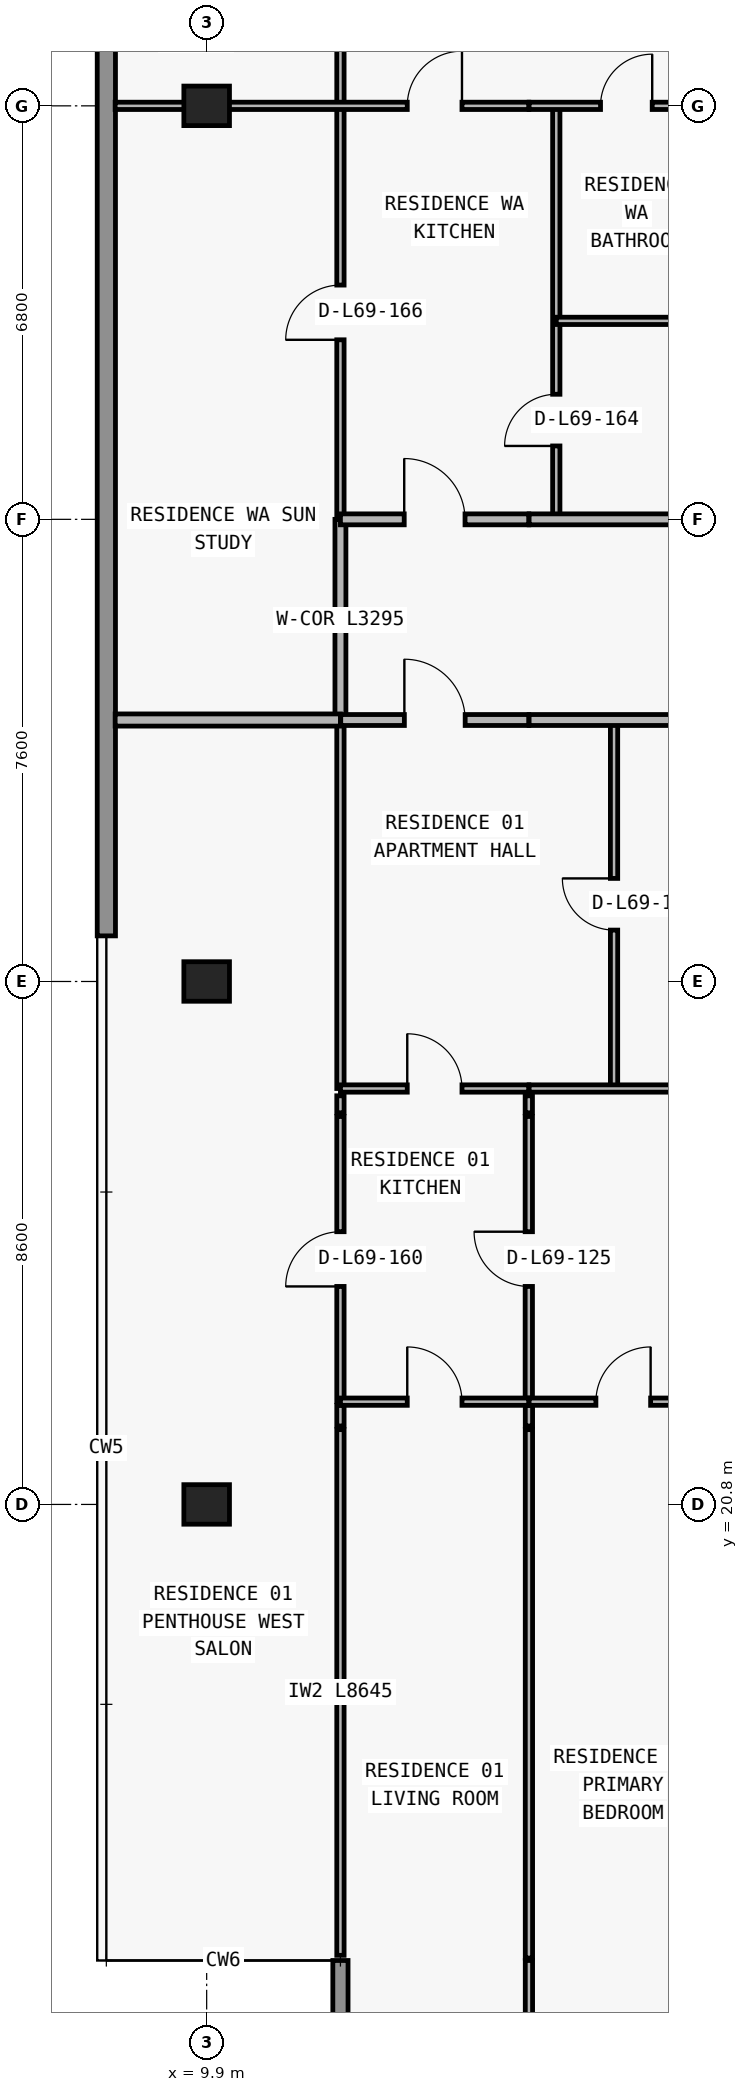
"""IFC4 building model, lengths in metres.
Left out: names, types, materials, properties, quantities, classifications, styles, units other than length and angle.
Written with IfcOpenShell. Run it as: python <this file> out.ifc"""

import sys

from ifc_helpers import new_model, si_unit, direction, frame, frame_2d, origin, origin_2d, place, context, subcontext, project, spatial, rectangle, extrude, element, fill, save


model = new_model("IFC4")
c1 = context("Model", 3, precision=1e-05, world=origin(), true_north=direction((0.0, 1.0)))
c2 = subcontext(c1, "Body", "Model", "MODEL_VIEW")
j1 = project(units=[si_unit("LENGTHUNIT", "METRE"), si_unit("PLANEANGLEUNIT", "RADIAN")], contexts=[c1])
p1 = place(None, origin())
s1 = spatial("IfcSite", under=j1, at=p1, CompositionType="ELEMENT")
p2 = place(p1, origin())
s2 = spatial("IfcBuilding", under=s1, at=p2, CompositionType="ELEMENT")
p3 = place(p2, frame((0.0, 0.0, 246.3)))
s3 = spatial("IfcBuildingStorey", under=s2, at=p3, CompositionType="ELEMENT", Elevation=246.3)
for number, where, z_axis, x_axis in (
    (1, (9.9, 20.8, 0.0), (0.0, 0.0, 1.0), (1.0, 0.0, 0.0)),
    (2, (9.9, 29.4, 0.0), (0.0, 0.0, 1.0), (1.0, 0.0, 0.0)),
    (3, (9.9, 43.8, 0.0), (0.0, 0.0, 1.0), (1.0, 0.0, 0.0)),
):
    element("IfcColumn", number, at=place(p3, frame(where, z_axis=z_axis, x_axis=x_axis)), inside=s3, PredefinedType="COLUMN", context=c2, shape_type="SweptSolid", body=[
        extrude(rectangle(XDim=0.75, YDim=0.65, at=origin_2d()), origin(), (0.0, 0.0, 1.0), 3.05),
    ])
p4 = place(p3, frame((12.1, 13.3, 0.0), z_axis=(0.0, 0.0, 1.0), x_axis=(0.0, -1.0, 0.0)))
e4 = element("IfcWall", 4, at=p4, inside=s3, PredefinedType="ELEMENTEDWALL", context=c2, shape_type="SweptSolid", body=[
    extrude(rectangle(XDim=3.45, YDim=0.25, at=frame_2d((1.725, 0.0))), origin(), (0.0, 0.0, 1.0), 3.05),
])
p5 = place(p3, frame((8.25, 30.15, 0.0), z_axis=(0.0, 0.0, 1.0), x_axis=(0.0, 1.0, 0.0)))
e5 = element("IfcWall", 5, at=p5, inside=s3, PredefinedType="STANDARD", context=c2, shape_type="SweptSolid", body=[
    extrude(rectangle(XDim=16.85, YDim=0.3, at=frame_2d((8.425, 0.0))), origin(), (0.0, 0.0, 1.0), 3.05),
])
p6 = place(p3, frame((12.1, 13.385, 0.0), z_axis=(0.0, 0.0, 1.0), x_axis=(0.0, 1.0, 0.0)))
e6 = element("IfcWall", 6, at=p6, inside=s3, PredefinedType="PARTITIONING", context=c2, shape_type="SweptSolid", body=[
    extrude(rectangle(XDim=8.645, YDim=0.12, at=frame_2d((4.323, 0.0))), origin(), (0.0, 0.0, 1.0), 2.725),
])
p7 = place(p3, frame((12.1, 22.09, 0.0), z_axis=(0.0, 0.0, 1.0), x_axis=(0.0, 1.0, 0.0)))
e7 = element("IfcWall", 7, at=p7, inside=s3, PredefinedType="PARTITIONING", context=c2, shape_type="SweptSolid", body=[
    extrude(rectangle(XDim=0.34, YDim=0.12, at=frame_2d((0.17, 0.0))), origin(), (0.0, 0.0, 1.0), 2.725),
])
p8 = place(p3, frame((12.1, 22.49, 0.0), z_axis=(0.0, 0.0, 1.0), x_axis=(0.0, 1.0, 0.0)))
e8 = element("IfcWall", 8, at=p8, inside=s3, PredefinedType="PARTITIONING", context=c2, shape_type="SweptSolid", body=[
    extrude(rectangle(XDim=4.69, YDim=0.12, at=frame_2d((2.345, 0.0))), origin(), (0.0, 0.0, 1.0), 2.725),
])
p9 = place(p8, frame((1.895, 0.0, 0.0)))
e9 = element("IfcOpeningElement", 9, at=p9, cuts=e8, PredefinedType="OPENING", context=c2, shape_type="SweptSolid", body=[
    extrude(rectangle(XDim=0.9, YDim=2.15, at=frame_2d((0.45, 1.075))), frame((0.0, 0.07, 0.0), z_axis=(0.0, -1.0, 0.0), x_axis=(1.0, 0.0, 0.0)), (0.0, 0.0, 1.0), 0.14),
])
p10 = place(p3, frame((12.1, 27.24, 0.0), z_axis=(0.0, 0.0, 1.0), x_axis=(0.0, 1.0, 0.0)))
e10 = element("IfcWall", 10, at=p10, inside=s3, PredefinedType="PARTITIONING", context=c2, shape_type="SweptSolid", body=[
    extrude(rectangle(XDim=0.28, YDim=0.12, at=frame_2d((0.14, 0.0))), origin(), (0.0, 0.0, 1.0), 2.725),
])
p11 = place(p3, frame((12.1, 27.64, 0.0), z_axis=(0.0, 0.0, 1.0), x_axis=(0.0, 1.0, 0.0)))
e11 = element("IfcWall", 11, at=p11, inside=s3, PredefinedType="PARTITIONING", context=c2, shape_type="SweptSolid", body=[
    extrude(rectangle(XDim=6.06, YDim=0.12, at=frame_2d((3.03, 0.0))), origin(), (0.0, 0.0, 1.0), 2.725),
])
p12 = place(p3, frame((12.1, 33.705, 0.0), z_axis=(0.0, 0.0, 1.0), x_axis=(0.0, 1.0, 0.0)))
e12 = element("IfcWall", 12, at=p12, inside=s3, PredefinedType="PARTITIONING", context=c2, shape_type="SweptSolid", body=[
    extrude(rectangle(XDim=3.295, YDim=0.18, at=frame_2d((1.647, 0.0))), origin(), (0.0, 0.0, 1.0), 2.725),
])
p13 = place(p3, frame((12.1, 37.005, 0.0), z_axis=(0.0, 0.0, 1.0), x_axis=(0.0, 1.0, 0.0)))
e13 = element("IfcWall", 13, at=p13, inside=s3, PredefinedType="PARTITIONING", context=c2, shape_type="SweptSolid", body=[
    extrude(rectangle(XDim=9.875, YDim=0.12, at=frame_2d((4.938, 0.0))), origin(), (0.0, 0.0, 1.0), 2.725),
])
p14 = place(p13, frame((2.948, 0.0, 0.0)))
e14 = element("IfcOpeningElement", 14, at=p14, cuts=e13, PredefinedType="OPENING", context=c2, shape_type="SweptSolid", body=[
    extrude(rectangle(XDim=0.9, YDim=2.15, at=frame_2d((0.45, 1.075))), frame((0.0, 0.07, 0.0), z_axis=(0.0, -1.0, 0.0), x_axis=(1.0, 0.0, 0.0)), (0.0, 0.0, 1.0), 0.14),
])
p15 = place(p13, frame((7.885, 0.0, 0.0)))
e15 = element("IfcOpeningElement", 15, at=p15, cuts=e13, PredefinedType="OPENING", context=c2, shape_type="SweptSolid", body=[
    extrude(rectangle(XDim=0.9, YDim=2.15, at=frame_2d((0.45, 1.075))), frame((0.0, 0.07, 0.0), z_axis=(0.0, -1.0, 0.0), x_axis=(1.0, 0.0, 0.0)), (0.0, 0.0, 1.0), 0.14),
])
p16 = place(p3, frame((15.198, 22.49, 0.0), z_axis=(0.0, 0.0, 1.0), x_axis=(0.0, 1.0, 0.0)))
e16 = element("IfcWall", 16, at=p16, inside=s3, PredefinedType="PARTITIONING", context=c2, shape_type="SweptSolid", body=[
    extrude(rectangle(XDim=4.69, YDim=0.12, at=frame_2d((2.345, 0.0))), origin(), (0.0, 0.0, 1.0), 3.05),
])
p17 = place(p16, frame((1.895, 0.0, 0.0)))
e17 = element("IfcOpeningElement", 17, at=p17, cuts=e16, PredefinedType="OPENING", context=c2, shape_type="SweptSolid", body=[
    extrude(rectangle(XDim=0.9, YDim=2.15, at=frame_2d((0.45, 1.075))), frame((0.0, 0.07, 0.0), z_axis=(0.0, -1.0, 0.0), x_axis=(1.0, 0.0, 0.0)), (0.0, 0.0, 1.0), 0.14),
])
p18 = place(p3, frame((15.198, 27.24, 0.0), z_axis=(0.0, 0.0, 1.0), x_axis=(0.0, 1.0, 0.0)))
e18 = element("IfcWall", 18, at=p18, inside=s3, PredefinedType="PARTITIONING", context=c2, shape_type="SweptSolid", body=[
    extrude(rectangle(XDim=0.28, YDim=0.12, at=frame_2d((0.14, 0.0))), origin(), (0.0, 0.0, 1.0), 3.05),
])
p19 = place(p3, frame((15.2, 9.995, 0.0), z_axis=(0.0, 0.0, 1.0), x_axis=(0.0, 1.0, 0.0)))
e19 = element("IfcWall", 19, at=p19, inside=s3, PredefinedType="PARTITIONING", context=c2, shape_type="SweptSolid", body=[
    extrude(rectangle(XDim=3.305, YDim=0.12, at=frame_2d((1.652, 0.0))), origin(), (0.0, 0.0, 1.0), 3.05),
])
p20 = place(p3, frame((15.2, 13.34, 0.0), z_axis=(0.0, 0.0, 1.0), x_axis=(0.0, 1.0, 0.0)))
e20 = element("IfcWall", 20, at=p20, inside=s3, PredefinedType="PARTITIONING", context=c2, shape_type="SweptSolid", body=[
    extrude(rectangle(XDim=8.69, YDim=0.12, at=frame_2d((4.345, 0.0))), origin(), (0.0, 0.0, 1.0), 3.05),
])
p21 = place(p3, frame((15.2, 22.09, 0.0), z_axis=(0.0, 0.0, 1.0), x_axis=(0.0, 1.0, 0.0)))
e21 = element("IfcWall", 21, at=p21, inside=s3, PredefinedType="PARTITIONING", context=c2, shape_type="SweptSolid", body=[
    extrude(rectangle(XDim=0.34, YDim=0.12, at=frame_2d((0.17, 0.0))), origin(), (0.0, 0.0, 1.0), 3.05),
])
p22 = place(p3, frame((15.65, 37.0, 0.0), z_axis=(0.0, 0.0, 1.0), x_axis=(0.0, 1.0, 0.0)))
e22 = element("IfcWall", 22, at=p22, inside=s3, PredefinedType="PARTITIONING", context=c2, shape_type="SweptSolid", body=[
    extrude(rectangle(XDim=6.8, YDim=0.12, at=frame_2d((3.4, 0.0))), origin(), (0.0, 0.0, 1.0), 3.05),
])
p23 = place(p22, frame((1.207, 0.0, 0.0)))
e23 = element("IfcOpeningElement", 23, at=p23, cuts=e22, PredefinedType="OPENING", context=c2, shape_type="SweptSolid", body=[
    extrude(rectangle(XDim=0.85, YDim=2.1, at=frame_2d((0.425, 1.05))), frame((0.0, 0.07, 0.0), z_axis=(0.0, -1.0, 0.0), x_axis=(1.0, 0.0, 0.0)), (0.0, 0.0, 1.0), 0.14),
])
p24 = place(p3, frame((16.6, 27.64, 0.0), z_axis=(0.0, 0.0, 1.0), x_axis=(0.0, 1.0, 0.0)))
e24 = element("IfcWall", 24, at=p24, inside=s3, PredefinedType="PARTITIONING", context=c2, shape_type="SweptSolid", body=[
    extrude(rectangle(XDim=6.06, YDim=0.12, at=frame_2d((3.03, 0.0))), origin(), (0.0, 0.0, 1.0), 3.05),
])
p25 = place(p24, frame((2.605, 0.0, 0.0)))
e25 = element("IfcOpeningElement", 25, at=p25, cuts=e24, PredefinedType="OPENING", context=c2, shape_type="SweptSolid", body=[
    extrude(rectangle(XDim=0.85, YDim=2.1, at=frame_2d((0.425, 1.05))), frame((0.0, 0.07, 0.0), z_axis=(0.0, -1.0, 0.0), x_axis=(1.0, 0.0, 0.0)), (0.0, 0.0, 1.0), 0.14),
])
p26 = place(p3, frame((12.1, 22.49, 0.0), z_axis=(0.0, 0.0, 1.0), x_axis=(1.0, 0.0, 0.0)))
e26 = element("IfcWall", 26, at=p26, inside=s3, PredefinedType="PARTITIONING", context=c2, shape_type="SweptSolid", body=[
    extrude(rectangle(XDim=3.098, YDim=0.12, at=frame_2d((1.549, 0.0))), origin(), (0.0, 0.0, 1.0), 3.05),
])
p27 = place(p26, frame((1.099, 0.0, 0.0)))
e27 = element("IfcOpeningElement", 27, at=p27, cuts=e26, PredefinedType="OPENING", context=c2, shape_type="SweptSolid", body=[
    extrude(rectangle(XDim=0.9, YDim=2.15, at=frame_2d((0.45, 1.075))), frame((0.0, 0.07, 0.0), z_axis=(0.0, -1.0, 0.0), x_axis=(1.0, 0.0, 0.0)), (0.0, 0.0, 1.0), 0.14),
])
p28 = place(p3, frame((15.203, 22.49, 0.0), z_axis=(0.0, 0.0, 1.0), x_axis=(1.0, 0.0, 0.0)))
e28 = element("IfcWall", 28, at=p28, inside=s3, PredefinedType="PARTITIONING", context=c2, shape_type="SweptSolid", body=[
    extrude(rectangle(XDim=3.097, YDim=0.12, at=frame_2d((1.549, 0.0))), origin(), (0.0, 0.0, 1.0), 3.05),
])
p29 = place(p28, frame((1.098, 0.0, 0.0)))
e29 = element("IfcOpeningElement", 29, at=p29, cuts=e28, PredefinedType="OPENING", context=c2, shape_type="SweptSolid", body=[
    extrude(rectangle(XDim=0.9, YDim=2.15, at=frame_2d((0.45, 1.075))), frame((0.0, 0.07, 0.0), z_axis=(0.0, -1.0, 0.0), x_axis=(1.0, 0.0, 0.0)), (0.0, 0.0, 1.0), 0.14),
])
p30 = place(p3, frame((12.1, 27.64, 0.0), z_axis=(0.0, 0.0, 1.0), x_axis=(1.0, 0.0, 0.0)))
e30 = element("IfcWall", 30, at=p30, inside=s3, PredefinedType="PARTITIONING", context=c2, shape_type="SweptSolid", body=[
    extrude(rectangle(XDim=3.098, YDim=0.12, at=frame_2d((1.549, 0.0))), origin(), (0.0, 0.0, 1.0), 3.05),
])
p31 = place(p30, frame((1.099, 0.0, 0.0)))
e31 = element("IfcOpeningElement", 31, at=p31, cuts=e30, PredefinedType="OPENING", context=c2, shape_type="SweptSolid", body=[
    extrude(rectangle(XDim=0.9, YDim=2.15, at=frame_2d((0.45, 1.075))), frame((0.0, 0.07, 0.0), z_axis=(0.0, -1.0, 0.0), x_axis=(1.0, 0.0, 0.0)), (0.0, 0.0, 1.0), 0.14),
])
p32 = place(p3, frame((15.203, 27.64, 0.0), z_axis=(0.0, 0.0, 1.0), x_axis=(1.0, 0.0, 0.0)))
e32 = element("IfcWall", 32, at=p32, inside=s3, PredefinedType="PARTITIONING", context=c2, shape_type="SweptSolid", body=[
    extrude(rectangle(XDim=3.097, YDim=0.12, at=frame_2d((1.549, 0.0))), origin(), (0.0, 0.0, 1.0), 3.05),
])
p33 = place(p3, frame((8.395, 33.7, 0.0), z_axis=(0.0, 0.0, 1.0), x_axis=(1.0, 0.0, 0.0)))
e33 = element("IfcWall", 33, at=p33, inside=s3, PredefinedType="PARTITIONING", context=c2, shape_type="SweptSolid", body=[
    extrude(rectangle(XDim=3.705, YDim=0.2, at=frame_2d((1.853, 0.0))), origin(), (0.0, 0.0, 1.0), 3.05),
])
p34 = place(p3, frame((12.105, 33.7, 0.0), z_axis=(0.0, 0.0, 1.0), x_axis=(1.0, 0.0, 0.0)))
e34 = element("IfcWall", 34, at=p34, inside=s3, PredefinedType="PARTITIONING", context=c2, shape_type="SweptSolid", body=[
    extrude(rectangle(XDim=3.093, YDim=0.18, at=frame_2d((1.546, 0.0))), origin(), (0.0, 0.0, 1.0), 3.05),
])
p35 = place(p34, frame((1.046, 0.0, 0.0)))
e35 = element("IfcOpeningElement", 35, at=p35, cuts=e34, PredefinedType="OPENING", context=c2, shape_type="SweptSolid", body=[
    extrude(rectangle(XDim=1.0, YDim=2.2, at=frame_2d((0.5, 1.1))), frame((0.0, 0.1, 0.0), z_axis=(0.0, -1.0, 0.0), x_axis=(1.0, 0.0, 0.0)), (0.0, 0.0, 1.0), 0.2),
])
p36 = place(p3, frame((15.203, 33.7, 0.0), z_axis=(0.0, 0.0, 1.0), x_axis=(1.0, 0.0, 0.0)))
e36 = element("IfcWall", 36, at=p36, inside=s3, PredefinedType="PARTITIONING", context=c2, shape_type="SweptSolid", body=[
    extrude(rectangle(XDim=25.992, YDim=0.18, at=frame_2d((12.996, 0.0))), origin(), (0.0, 0.0, 1.0), 3.05),
])
p37 = place(p36, frame((5.972, 0.0, 0.0)))
e37 = element("IfcOpeningElement", 37, at=p37, cuts=e36, PredefinedType="OPENING", context=c2, shape_type="SweptSolid", body=[
    extrude(rectangle(XDim=1.0, YDim=2.2, at=frame_2d((0.5, 1.1))), frame((0.0, 0.1, 0.0), z_axis=(0.0, -1.0, 0.0), x_axis=(1.0, 0.0, 0.0)), (0.0, 0.0, 1.0), 0.2),
])
p38 = place(p36, frame((14.364, 0.0, 0.0)))
e38 = element("IfcOpeningElement", 38, at=p38, cuts=e36, PredefinedType="OPENING", context=c2, shape_type="SweptSolid", body=[
    extrude(rectangle(XDim=1.0, YDim=2.2, at=frame_2d((0.5, 1.1))), frame((0.0, 0.1, 0.0), z_axis=(0.0, -1.0, 0.0), x_axis=(1.0, 0.0, 0.0)), (0.0, 0.0, 1.0), 0.2),
])
p39 = place(p3, frame((12.1, 37.0, 0.0), z_axis=(0.0, 0.0, 1.0), x_axis=(1.0, 0.0, 0.0)))
e39 = element("IfcWall", 39, at=p39, inside=s3, PredefinedType="PARTITIONING", context=c2, shape_type="SweptSolid", body=[
    extrude(rectangle(XDim=3.098, YDim=0.18, at=frame_2d((1.549, 0.0))), origin(), (0.0, 0.0, 1.0), 3.05),
])
p40 = place(p39, frame((1.049, 0.0, 0.0)))
e40 = element("IfcOpeningElement", 40, at=p40, cuts=e39, PredefinedType="OPENING", context=c2, shape_type="SweptSolid", body=[
    extrude(rectangle(XDim=1.0, YDim=2.2, at=frame_2d((0.5, 1.1))), frame((0.0, 0.1, 0.0), z_axis=(0.0, -1.0, 0.0), x_axis=(1.0, 0.0, 0.0)), (0.0, 0.0, 1.0), 0.2),
])
p41 = place(p3, frame((15.203, 37.0, 0.0), z_axis=(0.0, 0.0, 1.0), x_axis=(1.0, 0.0, 0.0)))
e41 = element("IfcWall", 41, at=p41, inside=s3, PredefinedType="PARTITIONING", context=c2, shape_type="SweptSolid", body=[
    extrude(rectangle(XDim=2.742, YDim=0.18, at=frame_2d((1.371, 0.0))), origin(), (0.0, 0.0, 1.0), 3.05),
])
p42 = place(p3, frame((15.65, 40.264, 0.0), z_axis=(0.0, 0.0, 1.0), x_axis=(1.0, 0.0, 0.0)))
e42 = element("IfcWall", 42, at=p42, inside=s3, PredefinedType="PARTITIONING", context=c2, shape_type="SweptSolid", body=[
    extrude(rectangle(XDim=2.305, YDim=0.12, at=frame_2d((1.153, 0.0))), origin(), (0.0, 0.0, 1.0), 3.05),
])
p43 = place(p3, frame((8.395, 43.8, 0.0), z_axis=(0.0, 0.0, 1.0), x_axis=(1.0, 0.0, 0.0)))
e43 = element("IfcWall", 43, at=p43, inside=s3, PredefinedType="PARTITIONING", context=c2, shape_type="SweptSolid", body=[
    extrude(rectangle(XDim=6.803, YDim=0.12, at=frame_2d((3.401, 0.0))), origin(), (0.0, 0.0, 1.0), 2.418),
])
p44 = place(p43, frame((4.804, 0.0, 0.0)))
e44 = element("IfcOpeningElement", 44, at=p44, cuts=e43, PredefinedType="OPENING", context=c2, shape_type="SweptSolid", body=[
    extrude(rectangle(XDim=0.9, YDim=2.15, at=frame_2d((0.45, 1.075))), frame((0.0, 0.07, 0.0), z_axis=(0.0, -1.0, 0.0), x_axis=(1.0, 0.0, 0.0)), (0.0, 0.0, 1.0), 0.14),
])
p45 = place(p3, frame((15.203, 43.8, 0.0), z_axis=(0.0, 0.0, 1.0), x_axis=(1.0, 0.0, 0.0)))
e45 = element("IfcWall", 45, at=p45, inside=s3, PredefinedType="PARTITIONING", context=c2, shape_type="SweptSolid", body=[
    extrude(rectangle(XDim=2.752, YDim=0.12, at=frame_2d((1.376, 0.0))), origin(), (0.0, 0.0, 1.0), 2.418),
])
p46 = place(p45, frame((1.175, 0.0, 0.0)))
e46 = element("IfcOpeningElement", 46, at=p46, cuts=e45, PredefinedType="OPENING", context=c2, shape_type="SweptSolid", body=[
    extrude(rectangle(XDim=0.85, YDim=2.1, at=frame_2d((0.425, 1.05))), frame((0.0, 0.07, 0.0), z_axis=(0.0, -1.0, 0.0), x_axis=(1.0, 0.0, 0.0)), (0.0, 0.0, 1.0), 0.14),
])
p47 = place(p35, origin())
e47 = element("IfcDoor", 47, at=p47, inside=s3, OperationType="SINGLE_SWING_LEFT", PredefinedType="DOOR", context=c2, shape_type="SweptSolid", body=[
    extrude(rectangle(XDim=1.0, YDim=2.2, at=frame_2d((0.5, 1.1))), frame((0.0, 0.025, 0.0), z_axis=(0.0, -1.0, 0.0), x_axis=(1.0, 0.0, 0.0)), (0.0, 0.0, 1.0), 0.05),
])
fill(e35, e47)
p48 = place(p25, origin())
e48 = element("IfcDoor", 48, at=p48, inside=s3, OperationType="SINGLE_SWING_RIGHT", PredefinedType="DOOR", context=c2, shape_type="SweptSolid", body=[
    extrude(rectangle(XDim=0.85, YDim=2.1, at=frame_2d((0.425, 1.05))), frame((0.0, 0.025, 0.0), z_axis=(0.0, -1.0, 0.0), x_axis=(1.0, 0.0, 0.0)), (0.0, 0.0, 1.0), 0.05),
])
fill(e25, e48)
p49 = place(p31, origin())
e49 = element("IfcDoor", 49, at=p49, inside=s3, OperationType="SINGLE_SWING_LEFT", PredefinedType="DOOR", context=c2, shape_type="SweptSolid", body=[
    extrude(rectangle(XDim=0.9, YDim=2.15, at=frame_2d((0.45, 1.075))), frame((0.0, 0.025, 0.0), z_axis=(0.0, -1.0, 0.0), x_axis=(1.0, 0.0, 0.0)), (0.0, 0.0, 1.0), 0.05),
])
fill(e31, e49)
p50 = place(p17, origin())
e50 = element("IfcDoor", 50, at=p50, inside=s3, OperationType="SINGLE_SWING_RIGHT", PredefinedType="DOOR", context=c2, shape_type="SweptSolid", body=[
    extrude(rectangle(XDim=0.9, YDim=2.15, at=frame_2d((0.45, 1.075))), frame((0.0, 0.025, 0.0), z_axis=(0.0, -1.0, 0.0), x_axis=(1.0, 0.0, 0.0)), (0.0, 0.0, 1.0), 0.05),
])
fill(e17, e50)
p51 = place(p27, origin())
e51 = element("IfcDoor", 51, at=p51, inside=s3, OperationType="SINGLE_SWING_LEFT", PredefinedType="DOOR", context=c2, shape_type="SweptSolid", body=[
    extrude(rectangle(XDim=0.9, YDim=2.15, at=frame_2d((0.45, 1.075))), frame((0.0, 0.025, 0.0), z_axis=(0.0, -1.0, 0.0), x_axis=(1.0, 0.0, 0.0)), (0.0, 0.0, 1.0), 0.05),
])
fill(e27, e51)
p52 = place(p29, origin())
e52 = element("IfcDoor", 52, at=p52, inside=s3, OperationType="SINGLE_SWING_RIGHT", PredefinedType="DOOR", context=c2, shape_type="SweptSolid", body=[
    extrude(rectangle(XDim=0.9, YDim=2.15, at=frame_2d((0.45, 1.075))), frame((0.0, 0.025, 0.0), z_axis=(0.0, -1.0, 0.0), x_axis=(1.0, 0.0, 0.0)), (0.0, 0.0, 1.0), 0.05),
])
fill(e29, e52)
p53 = place(p9, origin())
e53 = element("IfcDoor", 53, at=p53, inside=s3, OperationType="SINGLE_SWING_LEFT", PredefinedType="DOOR", context=c2, shape_type="SweptSolid", body=[
    extrude(rectangle(XDim=0.9, YDim=2.15, at=frame_2d((0.45, 1.075))), frame((0.0, 0.025, 0.0), z_axis=(0.0, -1.0, 0.0), x_axis=(1.0, 0.0, 0.0)), (0.0, 0.0, 1.0), 0.05),
])
fill(e9, e53)
p54 = place(p40, origin())
e54 = element("IfcDoor", 54, at=p54, inside=s3, OperationType="SINGLE_SWING_LEFT", PredefinedType="DOOR", context=c2, shape_type="SweptSolid", body=[
    extrude(rectangle(XDim=1.0, YDim=2.2, at=frame_2d((0.5, 1.1))), frame((0.0, 0.025, 0.0), z_axis=(0.0, -1.0, 0.0), x_axis=(1.0, 0.0, 0.0)), (0.0, 0.0, 1.0), 0.05),
])
fill(e40, e54)
p55 = place(p44, origin())
e55 = element("IfcDoor", 55, at=p55, inside=s3, OperationType="SINGLE_SWING_RIGHT", PredefinedType="DOOR", context=c2, shape_type="SweptSolid", body=[
    extrude(rectangle(XDim=0.9, YDim=2.15, at=frame_2d((0.45, 1.075))), frame((0.0, 0.025, 0.0), z_axis=(0.0, -1.0, 0.0), x_axis=(1.0, 0.0, 0.0)), (0.0, 0.0, 1.0), 0.05),
])
fill(e44, e55)
p56 = place(p23, origin())
e56 = element("IfcDoor", 56, at=p56, inside=s3, OperationType="SINGLE_SWING_LEFT", PredefinedType="DOOR", context=c2, shape_type="SweptSolid", body=[
    extrude(rectangle(XDim=0.85, YDim=2.1, at=frame_2d((0.425, 1.05))), frame((0.0, 0.025, 0.0), z_axis=(0.0, -1.0, 0.0), x_axis=(1.0, 0.0, 0.0)), (0.0, 0.0, 1.0), 0.05),
])
fill(e23, e56)
p57 = place(p46, origin())
e57 = element("IfcDoor", 57, at=p57, inside=s3, OperationType="SINGLE_SWING_RIGHT", PredefinedType="DOOR", context=c2, shape_type="SweptSolid", body=[
    extrude(rectangle(XDim=0.85, YDim=2.1, at=frame_2d((0.425, 1.05))), frame((0.0, 0.025, 0.0), z_axis=(0.0, -1.0, 0.0), x_axis=(1.0, 0.0, 0.0)), (0.0, 0.0, 1.0), 0.05),
])
fill(e46, e57)
p58 = place(p14, origin())
e58 = element("IfcDoor", 58, at=p58, inside=s3, OperationType="SINGLE_SWING_LEFT", PredefinedType="DOOR", context=c2, shape_type="SweptSolid", body=[
    extrude(rectangle(XDim=0.9, YDim=2.15, at=frame_2d((0.45, 1.075))), frame((0.0, 0.025, 0.0), z_axis=(0.0, -1.0, 0.0), x_axis=(1.0, 0.0, 0.0)), (0.0, 0.0, 1.0), 0.05),
])
fill(e14, e58)
save(model, sys.argv[1])
